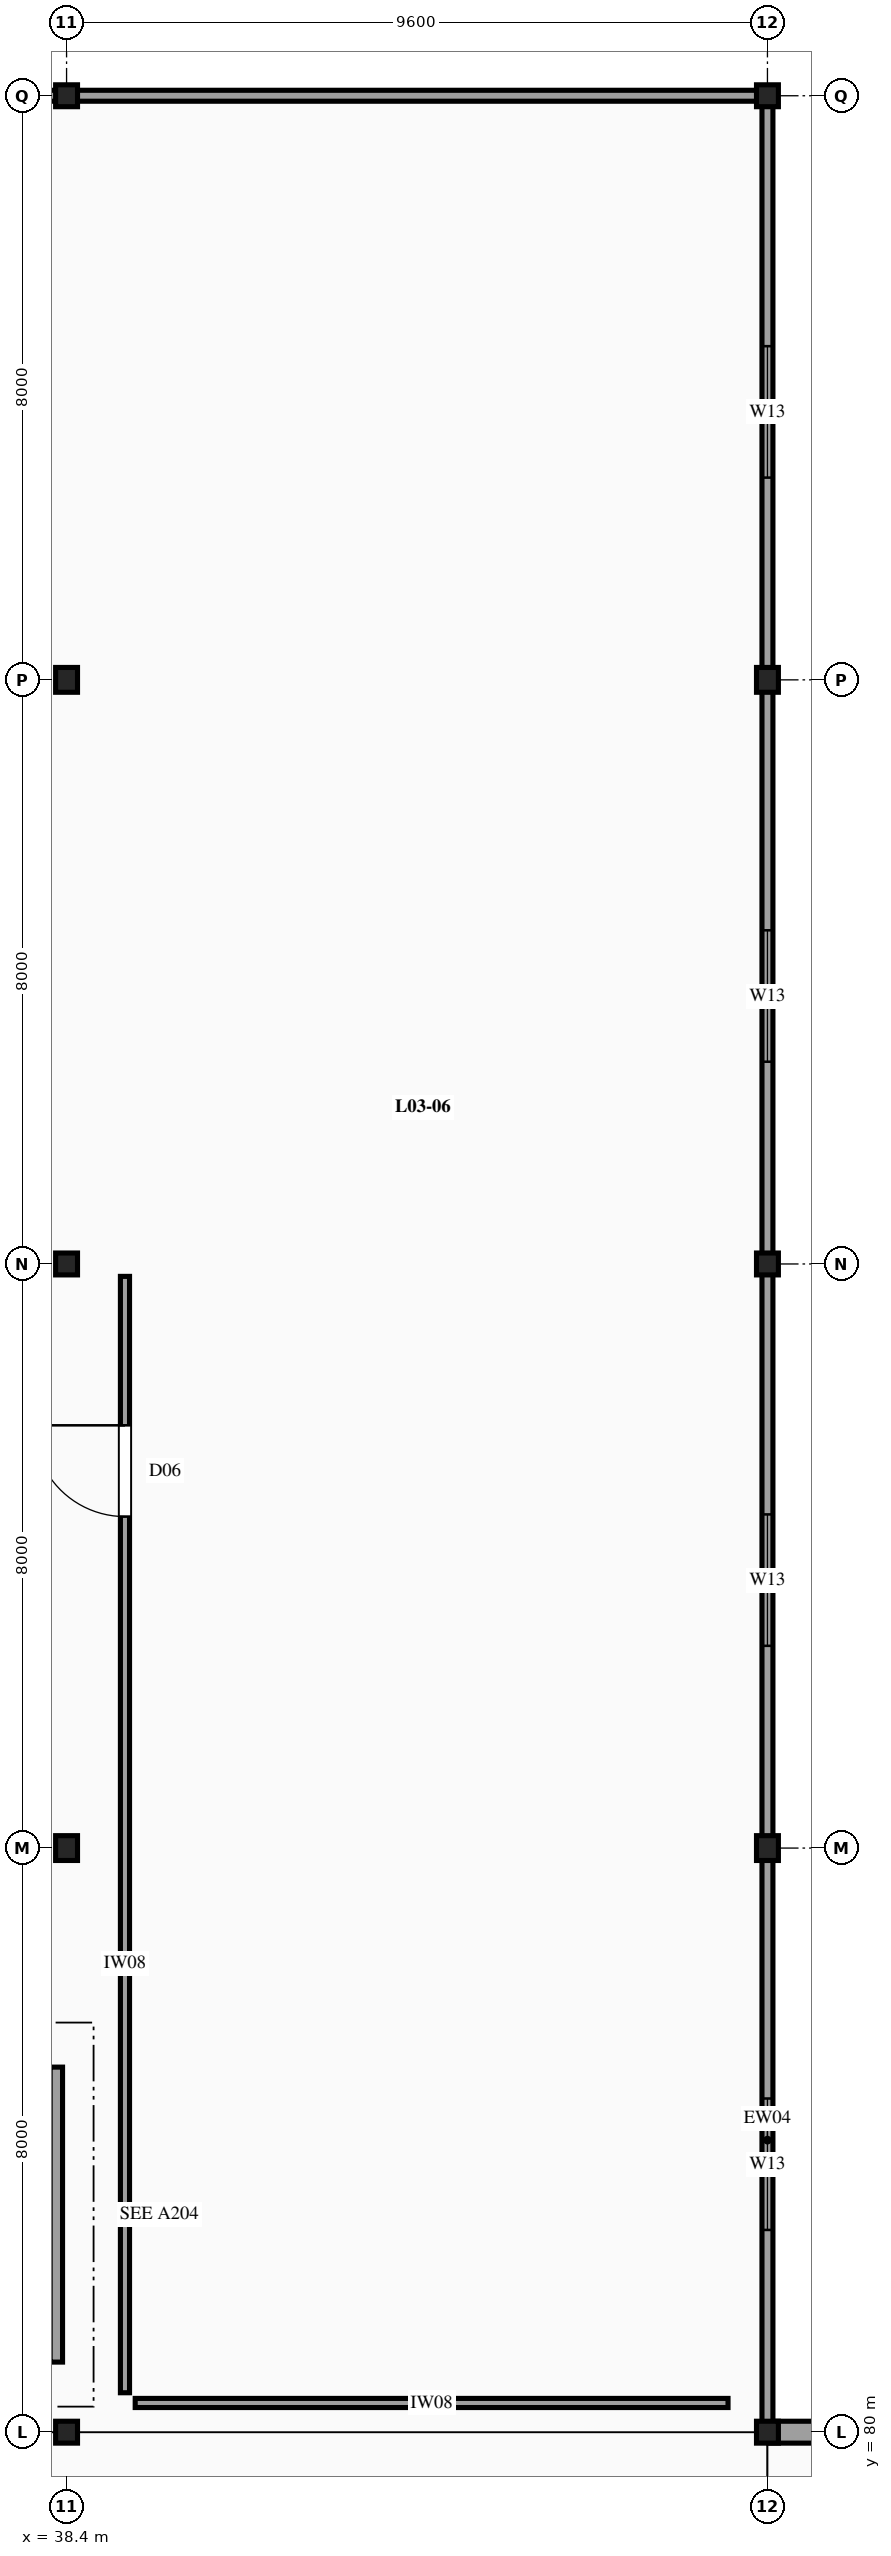
"""IFC4 building model, lengths in metres.
Left out: names, types, materials, properties, quantities, classifications, styles, units other than length and angle.
Written with IfcOpenShell. Run it as: python <this file> out.ifc"""

import sys

from ifc_helpers import new_model, si_unit, direction, frame, frame_2d, origin, origin_2d, place, context, subcontext, project, spatial, rectangle, i_section, extrude, element, fill, save


model = new_model("IFC4")
c1 = context("Model", 3, precision=1e-05, world=origin(), true_north=direction((0.0, 1.0)))
c2 = subcontext(c1, "Body", "Model", "MODEL_VIEW")
j1 = project(units=[si_unit("LENGTHUNIT", "METRE"), si_unit("PLANEANGLEUNIT", "RADIAN")], contexts=[c1])
p1 = place(None, origin())
s1 = spatial("IfcSite", under=j1, at=p1, CompositionType="ELEMENT")
p2 = place(p1, origin())
s2 = spatial("IfcBuilding", under=s1, at=p2, CompositionType="ELEMENT")
p3 = place(p2, frame((0.0, 0.0, 12.9)))
s3 = spatial("IfcBuildingStorey", under=s2, at=p3, CompositionType="ELEMENT", Elevation=12.9)
p4 = place(p3, frame((38.4, 80.0, -0.26), z_axis=(0.0, 0.0, 1.0), x_axis=(1.0, 0.0, 0.0)))
e1 = element("IfcColumn", 1, at=p4, inside=s3, PredefinedType="COLUMN", context=c2, shape_type="SweptSolid", body=[
    extrude(i_section(OverallWidth=0.3, OverallDepth=0.3, WebThickness=0.011, FlangeThickness=0.019, FilletRadius=0.027, at=origin_2d()), origin(), (0.0, 0.0, 1.0), 4.48),
])
p5 = place(p3, frame((38.4, 88.0, -0.26), z_axis=(0.0, 0.0, 1.0), x_axis=(1.0, 0.0, 0.0)))
e2 = element("IfcColumn", 2, at=p5, inside=s3, PredefinedType="COLUMN", context=c2, shape_type="SweptSolid", body=[
    extrude(i_section(OverallWidth=0.3, OverallDepth=0.34, WebThickness=0.012, FlangeThickness=0.021, FilletRadius=0.027, at=origin_2d()), origin(), (0.0, 0.0, 1.0), 4.48),
])
p6 = place(p3, frame((38.4, 96.0, -0.26), z_axis=(0.0, 0.0, 1.0), x_axis=(1.0, 0.0, 0.0)))
e3 = element("IfcColumn", 3, at=p6, inside=s3, PredefinedType="COLUMN", context=c2, shape_type="SweptSolid", body=[
    extrude(i_section(OverallWidth=0.3, OverallDepth=0.3, WebThickness=0.011, FlangeThickness=0.019, FilletRadius=0.027, at=origin_2d()), origin(), (0.0, 0.0, 1.0), 4.48),
])
p7 = place(p3, frame((38.4, 104.0, -0.26), z_axis=(0.0, 0.0, 1.0), x_axis=(1.0, 0.0, 0.0)))
e4 = element("IfcColumn", 4, at=p7, inside=s3, PredefinedType="COLUMN", context=c2, shape_type="SweptSolid", body=[
    extrude(i_section(OverallWidth=0.3, OverallDepth=0.34, WebThickness=0.012, FlangeThickness=0.021, FilletRadius=0.027, at=origin_2d()), origin(), (0.0, 0.0, 1.0), 4.48),
])
for number, where, z_axis, x_axis in (
    (5, (38.4, 112.0, -0.26), (0.0, 0.0, 1.0), (1.0, 0.0, 0.0)),
    (6, (48.0, 80.0, -0.26), (0.0, 0.0, 1.0), (1.0, 0.0, 0.0)),
):
    element("IfcColumn", number, at=place(p3, frame(where, z_axis=z_axis, x_axis=x_axis)), inside=s3, PredefinedType="COLUMN", context=c2, shape_type="SweptSolid", body=[
        extrude(i_section(OverallWidth=0.3, OverallDepth=0.3, WebThickness=0.011, FlangeThickness=0.019, FilletRadius=0.027, at=origin_2d()), origin(), (0.0, 0.0, 1.0), 4.48),
    ])
p8 = place(p3, frame((48.0, 88.0, -0.26), z_axis=(0.0, 0.0, 1.0), x_axis=(1.0, 0.0, 0.0)))
e7 = element("IfcColumn", 7, at=p8, inside=s3, PredefinedType="COLUMN", context=c2, shape_type="SweptSolid", body=[
    extrude(i_section(OverallWidth=0.3, OverallDepth=0.34, WebThickness=0.012, FlangeThickness=0.021, FilletRadius=0.027, at=origin_2d()), origin(), (0.0, 0.0, 1.0), 4.48),
])
p9 = place(p3, frame((48.0, 96.0, -0.26), z_axis=(0.0, 0.0, 1.0), x_axis=(1.0, 0.0, 0.0)))
e8 = element("IfcColumn", 8, at=p9, inside=s3, PredefinedType="COLUMN", context=c2, shape_type="SweptSolid", body=[
    extrude(i_section(OverallWidth=0.3, OverallDepth=0.3, WebThickness=0.011, FlangeThickness=0.019, FilletRadius=0.027, at=origin_2d()), origin(), (0.0, 0.0, 1.0), 4.48),
])
p10 = place(p3, frame((48.0, 104.0, -0.26), z_axis=(0.0, 0.0, 1.0), x_axis=(1.0, 0.0, 0.0)))
e9 = element("IfcColumn", 9, at=p10, inside=s3, PredefinedType="COLUMN", context=c2, shape_type="SweptSolid", body=[
    extrude(i_section(OverallWidth=0.3, OverallDepth=0.34, WebThickness=0.012, FlangeThickness=0.021, FilletRadius=0.027, at=origin_2d()), origin(), (0.0, 0.0, 1.0), 4.48),
])
p11 = place(p3, frame((48.0, 112.0, -0.26), z_axis=(0.0, 0.0, 1.0), x_axis=(1.0, 0.0, 0.0)))
e10 = element("IfcColumn", 10, at=p11, inside=s3, PredefinedType="COLUMN", context=c2, shape_type="SweptSolid", body=[
    extrude(i_section(OverallWidth=0.3, OverallDepth=0.3, WebThickness=0.011, FlangeThickness=0.019, FilletRadius=0.027, at=origin_2d()), origin(), (0.0, 0.0, 1.0), 4.48),
])
p12 = place(p3, frame((48.02, 80.0, 0.0), z_axis=(0.0, 0.0, 1.0), x_axis=(1.0, 0.0, 0.0)))
e11 = element("IfcWall", 11, at=p12, inside=s3, PredefinedType="SOLIDWALL", context=c2, shape_type="SweptSolid", body=[
    extrude(rectangle(XDim=9.56, YDim=0.3, at=frame_2d((4.78, 0.0))), origin(), (0.0, 0.0, 1.0), 3.54),
])
p13 = place(p12, frame((3.45, 0.0, 1.15)))
e12 = element("IfcOpeningElement", 12, at=p13, cuts=e11, PredefinedType="OPENING", context=c2, shape_type="SweptSolid", body=[
    extrude(rectangle(XDim=1.6, YDim=1.8, at=frame_2d((0.8, 0.9))), frame((0.0, 0.16, 0.0), z_axis=(0.0, -1.0, 0.0), x_axis=(1.0, 0.0, 0.0)), (0.0, 0.0, 1.0), 0.32),
])
p14 = place(p3, frame((28.82, 112.0, 0.0), z_axis=(0.0, 0.0, 1.0), x_axis=(1.0, 0.0, 0.0)))
e13 = element("IfcWall", 13, at=p14, inside=s3, PredefinedType="SOLIDWALL", context=c2, shape_type="SweptSolid", body=[
    extrude(rectangle(XDim=9.56, YDim=0.15, at=frame_2d((4.78, 0.0))), origin(), (0.0, 0.0, 1.0), 3.54),
])
p15 = place(p14, frame((3.25, 0.0, 0.95)))
e14 = element("IfcOpeningElement", 14, at=p15, cuts=e13, PredefinedType="OPENING", context=c2, shape_type="SweptSolid", body=[
    extrude(rectangle(XDim=2.4, YDim=2.2, at=frame_2d((1.2, 1.1))), frame((0.0, 0.085, 0.0), z_axis=(0.0, -1.0, 0.0), x_axis=(1.0, 0.0, 0.0)), (0.0, 0.0, 1.0), 0.17),
])
p16 = place(p3, frame((38.42, 112.0, 0.0), z_axis=(0.0, 0.0, 1.0), x_axis=(1.0, 0.0, 0.0)))
e15 = element("IfcWall", 15, at=p16, inside=s3, PredefinedType="SOLIDWALL", context=c2, shape_type="SweptSolid", body=[
    extrude(rectangle(XDim=9.56, YDim=0.15, at=frame_2d((4.78, 0.0))), origin(), (0.0, 0.0, 1.0), 3.54),
])
p17 = place(p3, frame((48.0, 80.02, 0.0), z_axis=(0.0, 0.0, 1.0), x_axis=(0.0, 1.0, 0.0)))
e16 = element("IfcWall", 16, at=p17, inside=s3, PredefinedType="SOLIDWALL", context=c2, shape_type="SweptSolid", body=[
    extrude(rectangle(XDim=7.96, YDim=0.15, at=frame_2d((3.98, 0.0))), origin(), (0.0, 0.0, 1.0), 3.54),
])
p18 = place(p17, frame((2.75, 0.0, 1.15)))
e17 = element("IfcOpeningElement", 17, at=p18, cuts=e16, PredefinedType="OPENING", context=c2, shape_type="SweptSolid", body=[
    extrude(rectangle(XDim=1.8, YDim=1.6, at=frame_2d((0.9, 0.8))), frame((0.0, 0.085, 0.0), z_axis=(0.0, -1.0, 0.0), x_axis=(1.0, 0.0, 0.0)), (0.0, 0.0, 1.0), 0.17),
])
p19 = place(p3, frame((48.0, 88.02, 0.0), z_axis=(0.0, 0.0, 1.0), x_axis=(0.0, 1.0, 0.0)))
e18 = element("IfcWall", 18, at=p19, inside=s3, PredefinedType="SOLIDWALL", context=c2, shape_type="SweptSolid", body=[
    extrude(rectangle(XDim=7.96, YDim=0.15, at=frame_2d((3.98, 0.0))), origin(), (0.0, 0.0, 1.0), 3.54),
])
p20 = place(p19, frame((2.75, 0.0, 1.15)))
e19 = element("IfcOpeningElement", 19, at=p20, cuts=e18, PredefinedType="OPENING", context=c2, shape_type="SweptSolid", body=[
    extrude(rectangle(XDim=1.8, YDim=1.6, at=frame_2d((0.9, 0.8))), frame((0.0, 0.085, 0.0), z_axis=(0.0, -1.0, 0.0), x_axis=(1.0, 0.0, 0.0)), (0.0, 0.0, 1.0), 0.17),
])
p21 = place(p3, frame((48.0, 96.02, 0.0), z_axis=(0.0, 0.0, 1.0), x_axis=(0.0, 1.0, 0.0)))
e20 = element("IfcWall", 20, at=p21, inside=s3, PredefinedType="SOLIDWALL", context=c2, shape_type="SweptSolid", body=[
    extrude(rectangle(XDim=7.96, YDim=0.15, at=frame_2d((3.98, 0.0))), origin(), (0.0, 0.0, 1.0), 3.54),
])
p22 = place(p21, frame((2.75, 0.0, 1.15)))
e21 = element("IfcOpeningElement", 21, at=p22, cuts=e20, PredefinedType="OPENING", context=c2, shape_type="SweptSolid", body=[
    extrude(rectangle(XDim=1.8, YDim=1.6, at=frame_2d((0.9, 0.8))), frame((0.0, 0.085, 0.0), z_axis=(0.0, -1.0, 0.0), x_axis=(1.0, 0.0, 0.0)), (0.0, 0.0, 1.0), 0.17),
])
p23 = place(p3, frame((48.0, 104.02, 0.0), z_axis=(0.0, 0.0, 1.0), x_axis=(0.0, 1.0, 0.0)))
e22 = element("IfcWall", 22, at=p23, inside=s3, PredefinedType="SOLIDWALL", context=c2, shape_type="SweptSolid", body=[
    extrude(rectangle(XDim=7.96, YDim=0.15, at=frame_2d((3.98, 0.0))), origin(), (0.0, 0.0, 1.0), 3.54),
])
p24 = place(p23, frame((2.75, 0.0, 1.15)))
e23 = element("IfcOpeningElement", 23, at=p24, cuts=e22, PredefinedType="OPENING", context=c2, shape_type="SweptSolid", body=[
    extrude(rectangle(XDim=1.8, YDim=1.6, at=frame_2d((0.9, 0.8))), frame((0.0, 0.085, 0.0), z_axis=(0.0, -1.0, 0.0), x_axis=(1.0, 0.0, 0.0)), (0.0, 0.0, 1.0), 0.17),
])
p25 = place(p3, frame((38.26, 80.96, 0.0), z_axis=(0.0, 0.0, 1.0), x_axis=(0.0, 1.0, 0.0)))
e24 = element("IfcWall", 24, at=p25, inside=s3, PredefinedType="SOLIDWALL", context=c2, shape_type="SweptSolid", body=[
    extrude(rectangle(XDim=4.04, YDim=0.17, at=frame_2d((2.02, 0.0))), origin(), (0.0, 0.0, 1.0), 3.38),
])
p26 = place(p3, frame((39.34, 80.4, 0.0), z_axis=(0.0, 0.0, 1.0), x_axis=(1.0, 0.0, 0.0)))
e25 = element("IfcWall", 25, at=p26, inside=s3, PredefinedType="PARTITIONING", context=c2, shape_type="SweptSolid", body=[
    extrude(rectangle(XDim=8.12, YDim=0.125, at=frame_2d((4.06, 0.0))), origin(), (0.0, 0.0, 1.0), 3.38),
])
p27 = place(p3, frame((39.2, 80.54, 0.0), z_axis=(0.0, 0.0, 1.0), x_axis=(0.0, 1.0, 0.0)))
e26 = element("IfcWall", 26, at=p27, inside=s3, PredefinedType="PARTITIONING", context=c2, shape_type="SweptSolid", body=[
    extrude(rectangle(XDim=15.29, YDim=0.125, at=frame_2d((7.645, 0.0))), origin(), (0.0, 0.0, 1.0), 3.38),
])
p28 = place(p27, frame((12.0, 0.0, 0.0)))
e27 = element("IfcOpeningElement", 27, at=p28, cuts=e26, PredefinedType="OPENING", context=c2, shape_type="SweptSolid", body=[
    extrude(rectangle(XDim=1.25, YDim=2.2, at=frame_2d((0.625, 1.1))), frame((0.0, 0.073, 0.0), z_axis=(0.0, -1.0, 0.0), x_axis=(1.0, 0.0, 0.0)), (0.0, 0.0, 1.0), 0.145),
])
p29 = place(p18, origin())
e28 = element("IfcWindow", 28, at=p29, inside=s3, PartitioningType="SINGLE_PANEL", PredefinedType="WINDOW", context=c2, shape_type="SweptSolid", body=[
    extrude(rectangle(XDim=1.8, YDim=1.6, at=frame_2d((0.9, 0.8))), frame((0.0, 0.03, 0.0), z_axis=(0.0, -1.0, 0.0), x_axis=(1.0, 0.0, 0.0)), (0.0, 0.0, 1.0), 0.06),
])
fill(e17, e28)
p30 = place(p20, origin())
e29 = element("IfcWindow", 29, at=p30, inside=s3, PartitioningType="SINGLE_PANEL", PredefinedType="WINDOW", context=c2, shape_type="SweptSolid", body=[
    extrude(rectangle(XDim=1.8, YDim=1.6, at=frame_2d((0.9, 0.8))), frame((0.0, 0.03, 0.0), z_axis=(0.0, -1.0, 0.0), x_axis=(1.0, 0.0, 0.0)), (0.0, 0.0, 1.0), 0.06),
])
fill(e19, e29)
p31 = place(p22, origin())
e30 = element("IfcWindow", 30, at=p31, inside=s3, PartitioningType="SINGLE_PANEL", PredefinedType="WINDOW", context=c2, shape_type="SweptSolid", body=[
    extrude(rectangle(XDim=1.8, YDim=1.6, at=frame_2d((0.9, 0.8))), frame((0.0, 0.03, 0.0), z_axis=(0.0, -1.0, 0.0), x_axis=(1.0, 0.0, 0.0)), (0.0, 0.0, 1.0), 0.06),
])
fill(e21, e30)
p32 = place(p24, origin())
e31 = element("IfcWindow", 31, at=p32, inside=s3, PartitioningType="SINGLE_PANEL", PredefinedType="WINDOW", context=c2, shape_type="SweptSolid", body=[
    extrude(rectangle(XDim=1.8, YDim=1.6, at=frame_2d((0.9, 0.8))), frame((0.0, 0.03, 0.0), z_axis=(0.0, -1.0, 0.0), x_axis=(1.0, 0.0, 0.0)), (0.0, 0.0, 1.0), 0.06),
])
fill(e23, e31)
p33 = place(p28, origin())
e32 = element("IfcDoor", 32, at=p33, inside=s3, OperationType="SINGLE_SWING_RIGHT", PredefinedType="DOOR", context=c2, shape_type="SweptSolid", body=[
    extrude(rectangle(XDim=1.25, YDim=2.2, at=frame_2d((0.625, 1.1))), frame((0.0, 0.025, 0.0), z_axis=(0.0, -1.0, 0.0), x_axis=(1.0, 0.0, 0.0)), (0.0, 0.0, 1.0), 0.05),
])
fill(e27, e32)
save(model, sys.argv[1])
